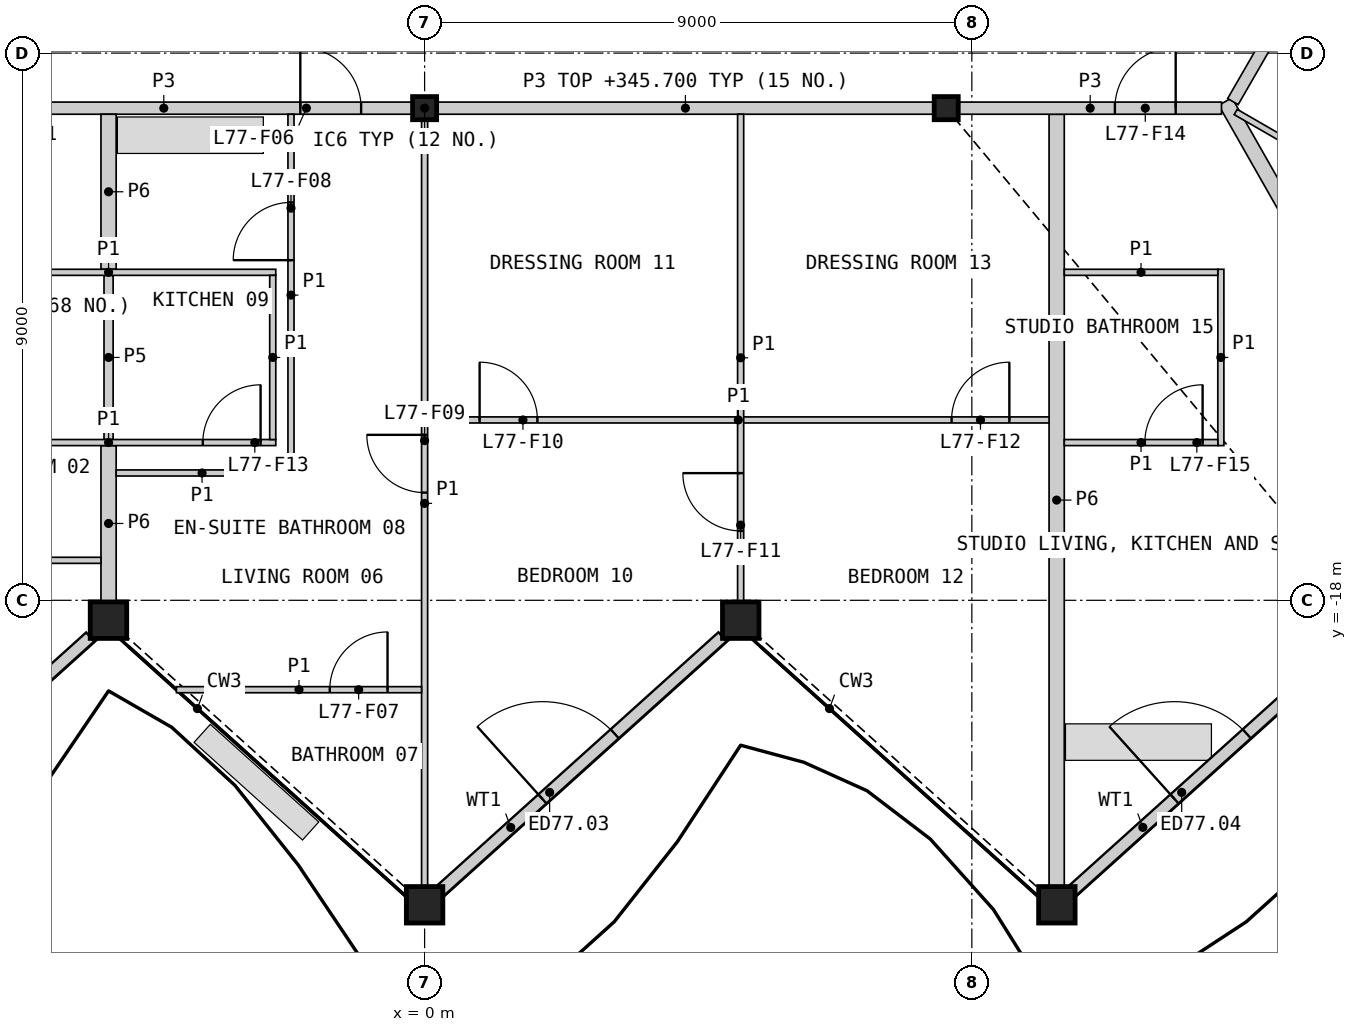
"""IFC4 building model, lengths in metres.
Left out: names, types, materials, properties, quantities, classifications, styles, units other than length and angle.
Written with IfcOpenShell. Run it as: python <this file> out.ifc"""

import sys

from ifc_helpers import new_model, si_unit, direction, frame, frame_2d, origin, origin_2d, place, context, subcontext, project, spatial, rectangle, hollow_rectangle, i_section, extrude, element, fill, save


model = new_model("IFC4")
c1 = context("Model", 3, precision=1e-05, world=origin(), true_north=direction((0.0, 1.0)))
c2 = subcontext(c1, "Body", "Model", "MODEL_VIEW")
j1 = project(units=[si_unit("LENGTHUNIT", "METRE"), si_unit("PLANEANGLEUNIT", "RADIAN")], contexts=[c1])
p1 = place(None, origin())
s1 = spatial("IfcSite", under=j1, at=p1, CompositionType="ELEMENT")
p2 = place(p1, origin())
s2 = spatial("IfcBuilding", under=s1, at=p2, CompositionType="ELEMENT")
p3 = place(p2, frame((0.0, 0.0, 342.6)))
s3 = spatial("IfcBuildingStorey", under=s2, at=p3, CompositionType="ELEMENT", Elevation=342.6)
for number, where, z_axis, x_axis in (
    (1, (-5.199, -18.327, 0.0), (0.0, 0.0, 1.0), (1.0, 0.0, 0.0)),
    (2, (0.0, -23.008, 0.0), (0.0, 0.0, 1.0), (1.0, 0.0, 0.0)),
    (3, (5.199, -18.327, 0.0), (0.0, 0.0, 1.0), (1.0, 0.0, 0.0)),
    (4, (10.398, -23.008, 0.0), (0.0, 0.0, 1.0), (1.0, 0.0, 0.0)),
):
    element("IfcColumn", number, at=place(p3, frame(where, z_axis=z_axis, x_axis=x_axis)), inside=s3, PredefinedType="COLUMN", context=c2, shape_type="SweptSolid", body=[
        extrude(hollow_rectangle(XDim=0.6, YDim=0.6, WallThickness=0.04, at=origin_2d()), origin(), (0.0, 0.0, 1.0), 3.4),
    ])
for number, where, z_axis, x_axis in (
    (5, (0.0, -9.906, 0.0), (0.0, 0.0, 1.0), (1.0, 0.0, 0.0)),
    (6, (8.578, -9.906, 0.0), (0.0, 0.0, 1.0), (1.0, 0.0, 0.0)),
):
    element("IfcColumn", number, at=place(p3, frame(where, z_axis=z_axis, x_axis=x_axis)), inside=s3, PredefinedType="COLUMN", context=c2, shape_type="SweptSolid", body=[
        extrude(i_section(OverallWidth=0.396, OverallDepth=0.381, WebThickness=0.019, FlangeThickness=0.03, at=origin_2d()), origin(), (0.0, 0.0, 1.0), 3.4),
    ])
p4 = place(p3, frame((-10.139, -22.781, 0.0), z_axis=(0.0, 0.0, 1.0), x_axis=(0.743144430218, 0.669131045339, 0.0)))
e7 = element("IfcWall", 7, at=p4, inside=s3, PredefinedType="SOLIDWALL", context=c2, shape_type="SweptSolid", body=[
    extrude(rectangle(XDim=6.244, YDim=0.2, at=frame_2d((3.122, 0.0))), origin(), (0.0, 0.0, 1.0), 2.488),
])
p5 = place(p4, frame((2.263, 0.0, 0.0)))
e8 = element("IfcOpeningElement", 8, at=p5, cuts=e7, PredefinedType="OPENING", context=c2, shape_type="SweptSolid", body=[
    extrude(rectangle(XDim=1.6, YDim=2.25, at=frame_2d((0.8, 1.125))), frame((0.0, 0.11, 0.0), z_axis=(0.0, -1.0, 0.0), x_axis=(1.0, 0.0, 0.0)), (0.0, 0.0, 1.0), 0.22),
])
p6 = place(p3, frame((0.256, -22.781, 0.0), z_axis=(0.0, 0.0, 1.0), x_axis=(0.743138703901, 0.669137404995, 0.0)))
e9 = element("IfcWall", 9, at=p6, inside=s3, PredefinedType="SOLIDWALL", context=c2, shape_type="SweptSolid", body=[
    extrude(rectangle(XDim=6.249, YDim=0.2, at=frame_2d((3.124, 0.0))), origin(), (0.0, 0.0, 1.0), 2.488),
])
p7 = place(p6, frame((2.263, 0.0, 0.0)))
e10 = element("IfcOpeningElement", 10, at=p7, cuts=e9, PredefinedType="OPENING", context=c2, shape_type="SweptSolid", body=[
    extrude(rectangle(XDim=1.6, YDim=2.25, at=frame_2d((0.8, 1.125))), frame((0.0, 0.11, 0.0), z_axis=(0.0, -1.0, 0.0), x_axis=(1.0, 0.0, 0.0)), (0.0, 0.0, 1.0), 0.22),
])
p8 = place(p3, frame((10.651, -22.781, 0.0), z_axis=(0.0, 0.0, 1.0), x_axis=(0.743154335217, 0.669120044572, 0.0)))
e11 = element("IfcWall", 11, at=p8, inside=s3, PredefinedType="SOLIDWALL", context=c2, shape_type="SweptSolid", body=[
    extrude(rectangle(XDim=6.252, YDim=0.2, at=frame_2d((3.126, 0.0))), origin(), (0.0, 0.0, 1.0), 2.488),
])
p9 = place(p8, frame((2.263, 0.0, 0.0)))
e12 = element("IfcOpeningElement", 12, at=p9, cuts=e11, PredefinedType="OPENING", context=c2, shape_type="SweptSolid", body=[
    extrude(rectangle(XDim=1.6, YDim=2.25, at=frame_2d((0.8, 1.125))), frame((0.0, 0.11, 0.0), z_axis=(0.0, -1.0, 0.0), x_axis=(1.0, 0.0, 0.0)), (0.0, 0.0, 1.0), 0.22),
])
p10 = place(p3, frame((13.169, -9.797, 0.0), z_axis=(0.0, 0.0, 1.0), x_axis=(0.494414335079, -0.869226360201, 0.0)))
e13 = element("IfcWall", 13, at=p10, inside=s3, PredefinedType="PARTITIONING", context=c2, shape_type="SweptSolid", body=[
    extrude(rectangle(XDim=14.842, YDim=0.25, at=frame_2d((7.421, 0.0))), origin(), (0.0, 0.0, 1.0), 2.33),
])
p11 = place(p3, frame((10.395, -22.698, 0.0), z_axis=(0.0, 0.0, 1.0), x_axis=(0.0, 1.0, 0.0)))
e14 = element("IfcWall", 14, at=p11, inside=s3, PredefinedType="PARTITIONING", context=c2, shape_type="SweptSolid", body=[
    extrude(rectangle(XDim=12.692, YDim=0.25, at=frame_2d((6.346, 0.0))), origin(), (0.0, 0.0, 1.0), 2.33),
])
p12 = place(p3, frame((0.208, -9.906, 0.0), z_axis=(0.0, 0.0, 1.0), x_axis=(1.0, 0.0, 0.0)))
e15 = element("IfcWall", 15, at=p12, inside=s3, PredefinedType="PARTITIONING", context=c2, shape_type="SweptSolid", body=[
    extrude(rectangle(XDim=8.163, YDim=0.2, at=frame_2d((4.082, 0.0))), origin(), (0.0, 0.0, 1.0), 3.1),
])
p13 = place(p3, frame((-8.371, -9.906, 0.0), z_axis=(0.0, 0.0, 1.0), x_axis=(1.0, 0.0, 0.0)))
e16 = element("IfcWall", 16, at=p13, inside=s3, PredefinedType="PARTITIONING", context=c2, shape_type="SweptSolid", body=[
    extrude(rectangle(XDim=8.163, YDim=0.2, at=frame_2d((4.082, 0.0))), origin(), (0.0, 0.0, 1.0), 3.1),
])
p14 = place(p13, frame((1.159, 0.0, 0.0)))
e17 = element("IfcOpeningElement", 17, at=p14, cuts=e16, PredefinedType="OPENING", context=c2, shape_type="SweptSolid", body=[
    extrude(rectangle(XDim=1.0, YDim=2.1, at=frame_2d((0.5, 1.05))), frame((0.0, 0.11, 0.0), z_axis=(0.0, -1.0, 0.0), x_axis=(1.0, 0.0, 0.0)), (0.0, 0.0, 1.0), 0.22),
])
p15 = place(p13, frame((6.327, 0.0, 0.0)))
e18 = element("IfcOpeningElement", 18, at=p15, cuts=e16, PredefinedType="OPENING", context=c2, shape_type="SweptSolid", body=[
    extrude(rectangle(XDim=1.0, YDim=2.1, at=frame_2d((0.5, 1.05))), frame((0.0, 0.11, 0.0), z_axis=(0.0, -1.0, 0.0), x_axis=(1.0, 0.0, 0.0)), (0.0, 0.0, 1.0), 0.22),
])
p16 = place(p3, frame((8.786, -9.906, 0.0), z_axis=(0.0, 0.0, 1.0), x_axis=(1.0, 0.0, 0.0)))
e19 = element("IfcWall", 19, at=p16, inside=s3, PredefinedType="PARTITIONING", context=c2, shape_type="SweptSolid", body=[
    extrude(rectangle(XDim=4.32, YDim=0.2, at=frame_2d((2.16, 0.0))), origin(), (0.0, 0.0, 1.0), 3.1),
])
p17 = place(p16, frame((2.566, 0.0, 0.0)))
e20 = element("IfcOpeningElement", 20, at=p17, cuts=e19, PredefinedType="OPENING", context=c2, shape_type="SweptSolid", body=[
    extrude(rectangle(XDim=1.0, YDim=2.1, at=frame_2d((0.5, 1.05))), frame((0.0, 0.11, 0.0), z_axis=(0.0, -1.0, 0.0), x_axis=(1.0, 0.0, 0.0)), (0.0, 0.0, 1.0), 0.22),
])
p18 = place(p3, frame((13.293, -9.797, 0.0), z_axis=(0.0, 0.0, 1.0), x_axis=(0.499967746641, 0.866044024469, 0.0)))
e21 = element("IfcWall", 21, at=p18, inside=s3, PredefinedType="PARTITIONING", context=c2, shape_type="SweptSolid", body=[
    extrude(rectangle(XDim=3.676, YDim=0.2, at=frame_2d((1.838, 0.0))), origin(), (0.0, 0.0, 1.0), 3.1),
])
p19 = place(p18, frame((2.426, 0.0, 0.0)))
e22 = element("IfcOpeningElement", 22, at=p19, cuts=e21, PredefinedType="OPENING", context=c2, shape_type="SweptSolid", body=[
    extrude(rectangle(XDim=1.0, YDim=2.1, at=frame_2d((0.5, 1.05))), frame((0.0, 0.11, 0.0), z_axis=(0.0, -1.0, 0.0), x_axis=(1.0, 0.0, 0.0)), (0.0, 0.0, 1.0), 0.22),
])
p20 = place(p3, frame((-5.198, -12.556, 0.0), z_axis=(0.0, 0.0, 1.0), x_axis=(0.0, 1.0, 0.0)))
e23 = element("IfcWall", 23, at=p20, inside=s3, PredefinedType="PARTITIONING", context=c2, shape_type="SweptSolid", body=[
    extrude(rectangle(XDim=2.55, YDim=0.25, at=frame_2d((1.275, 0.0))), origin(), (0.0, 0.0, 1.0), 2.33),
])
p21 = place(p3, frame((-5.198, -18.017, 0.0), z_axis=(0.0, 0.0, 1.0), x_axis=(0.0, 1.0, 0.0)))
e24 = element("IfcWall", 24, at=p21, inside=s3, PredefinedType="PARTITIONING", context=c2, shape_type="SweptSolid", body=[
    extrude(rectangle(XDim=2.561, YDim=0.25, at=frame_2d((1.281, 0.0))), origin(), (0.0, 0.0, 1.0), 2.33),
])
p22 = place(p3, frame((-5.198, -15.356, 0.0), z_axis=(0.0, 0.0, 1.0), x_axis=(0.0, 1.0, 0.0)))
e25 = element("IfcWall", 25, at=p22, inside=s3, PredefinedType="PLUMBINGWALL", context=c2, shape_type="SweptSolid", body=[
    extrude(rectangle(XDim=2.7, YDim=0.15, at=frame_2d((1.35, 0.0))), origin(), (0.0, 0.0, 1.0), 2.33),
])
p23 = place(p3, frame((0.0, -22.698, 0.0), z_axis=(0.0, 0.0, 1.0), x_axis=(0.0, 1.0, 0.0)))
e26 = element("IfcWall", 26, at=p23, inside=s3, PredefinedType="PARTITIONING", context=c2, shape_type="SweptSolid", body=[
    extrude(rectangle(XDim=12.585, YDim=0.1, at=frame_2d((6.292, 0.0))), origin(), (0.0, 0.0, 1.0), 2.33),
])
p24 = place(p23, frame((6.469, 0.0, 0.0)))
e27 = element("IfcOpeningElement", 27, at=p24, cuts=e26, PredefinedType="OPENING", context=c2, shape_type="SweptSolid", body=[
    extrude(rectangle(XDim=0.95, YDim=2.1, at=frame_2d((0.475, 1.05))), frame((0.0, 0.06, 0.0), z_axis=(0.0, -1.0, 0.0), x_axis=(1.0, 0.0, 0.0)), (0.0, 0.0, 1.0), 0.12),
])
p25 = place(p3, frame((0.05, -15.033, 0.0), z_axis=(0.0, 0.0, 1.0), x_axis=(1.0, 0.0, 0.0)))
e28 = element("IfcWall", 28, at=p25, inside=s3, PredefinedType="PARTITIONING", context=c2, shape_type="SweptSolid", body=[
    extrude(rectangle(XDim=10.22, YDim=0.1, at=frame_2d((5.11, 0.0))), origin(), (0.0, 0.0, 1.0), 2.33),
])
p26 = place(p25, frame((0.855, 0.0, 0.0)))
e29 = element("IfcOpeningElement", 29, at=p26, cuts=e28, PredefinedType="OPENING", context=c2, shape_type="SweptSolid", body=[
    extrude(rectangle(XDim=0.95, YDim=2.1, at=frame_2d((0.475, 1.05))), frame((0.0, 0.06, 0.0), z_axis=(0.0, -1.0, 0.0), x_axis=(1.0, 0.0, 0.0)), (0.0, 0.0, 1.0), 0.12),
])
p27 = place(p25, frame((8.617, 0.0, 0.0)))
e30 = element("IfcOpeningElement", 30, at=p27, cuts=e28, PredefinedType="OPENING", context=c2, shape_type="SweptSolid", body=[
    extrude(rectangle(XDim=0.95, YDim=2.1, at=frame_2d((0.475, 1.05))), frame((0.0, 0.06, 0.0), z_axis=(0.0, -1.0, 0.0), x_axis=(1.0, 0.0, 0.0)), (0.0, 0.0, 1.0), 0.12),
])
p28 = place(p3, frame((5.198, -18.017, 0.0), z_axis=(0.0, 0.0, 1.0), x_axis=(0.0, 1.0, 0.0)))
e31 = element("IfcWall", 31, at=p28, inside=s3, PredefinedType="PARTITIONING", context=c2, shape_type="SweptSolid", body=[
    extrude(rectangle(XDim=8.011, YDim=0.1, at=frame_2d((4.006, 0.0))), origin(), (0.0, 0.0, 1.0), 2.33),
])
p29 = place(p28, frame((1.158, 0.0, 0.0)))
e32 = element("IfcOpeningElement", 32, at=p29, cuts=e31, PredefinedType="OPENING", context=c2, shape_type="SweptSolid", body=[
    extrude(rectangle(XDim=0.95, YDim=2.1, at=frame_2d((0.475, 1.05))), frame((0.0, 0.06, 0.0), z_axis=(0.0, -1.0, 0.0), x_axis=(1.0, 0.0, 0.0)), (0.0, 0.0, 1.0), 0.12),
])
p30 = place(p3, frame((-2.198, -15.956, 0.0), z_axis=(0.0, 0.0, 1.0), x_axis=(0.0, 1.0, 0.0)))
e33 = element("IfcWall", 33, at=p30, inside=s3, PredefinedType="PARTITIONING", context=c2, shape_type="SweptSolid", body=[
    extrude(rectangle(XDim=5.95, YDim=0.1, at=frame_2d((2.975, 0.0))), origin(), (0.0, 0.0, 1.0), 2.33),
])
p31 = place(p30, frame((3.55, 0.0, 0.0)))
e34 = element("IfcOpeningElement", 34, at=p31, cuts=e33, PredefinedType="OPENING", context=c2, shape_type="SweptSolid", body=[
    extrude(rectangle(XDim=0.95, YDim=2.1, at=frame_2d((0.475, 1.05))), frame((0.0, 0.06, 0.0), z_axis=(0.0, -1.0, 0.0), x_axis=(1.0, 0.0, 0.0)), (0.0, 0.0, 1.0), 0.12),
])
p32 = place(p3, frame((-7.948, -12.606, 0.0), z_axis=(0.0, 0.0, 1.0), x_axis=(1.0, 0.0, 0.0)))
e35 = element("IfcWall", 35, at=p32, inside=s3, PredefinedType="PARTITIONING", context=c2, shape_type="SweptSolid", body=[
    extrude(rectangle(XDim=5.5, YDim=0.1, at=frame_2d((2.75, 0.0))), origin(), (0.0, 0.0, 1.0), 2.33),
])
p33 = place(p3, frame((-7.948, -15.406, 0.0), z_axis=(0.0, 0.0, 1.0), x_axis=(1.0, 0.0, 0.0)))
e36 = element("IfcWall", 36, at=p33, inside=s3, PredefinedType="PARTITIONING", context=c2, shape_type="SweptSolid", body=[
    extrude(rectangle(XDim=5.5, YDim=0.1, at=frame_2d((2.75, 0.0))), origin(), (0.0, 0.0, 1.0), 2.33),
])
p34 = place(p33, frame((4.3, 0.0, 0.0)))
e37 = element("IfcOpeningElement", 37, at=p34, cuts=e36, PredefinedType="OPENING", context=c2, shape_type="SweptSolid", body=[
    extrude(rectangle(XDim=0.95, YDim=2.1, at=frame_2d((0.475, 1.05))), frame((0.0, 0.06, 0.0), z_axis=(0.0, -1.0, 0.0), x_axis=(1.0, 0.0, 0.0)), (0.0, 0.0, 1.0), 0.12),
])
p35 = place(p3, frame((-10.345, -17.342, 0.0), z_axis=(0.0, 0.0, 1.0), x_axis=(1.0, 0.0, 0.0)))
e38 = element("IfcWall", 38, at=p35, inside=s3, PredefinedType="PARTITIONING", context=c2, shape_type="SweptSolid", body=[
    extrude(rectangle(XDim=5.023, YDim=0.1, at=frame_2d((2.511, 0.0))), origin(), (0.0, 0.0, 1.0), 2.33),
])
p36 = place(p35, frame((0.76, 0.0, 0.0)))
e39 = element("IfcOpeningElement", 39, at=p36, cuts=e38, PredefinedType="OPENING", context=c2, shape_type="SweptSolid", body=[
    extrude(rectangle(XDim=0.95, YDim=2.1, at=frame_2d((0.475, 1.05))), frame((0.0, 0.06, 0.0), z_axis=(0.0, -1.0, 0.0), x_axis=(1.0, 0.0, 0.0)), (0.0, 0.0, 1.0), 0.12),
])
p37 = place(p3, frame((-4.082, -19.47, 0.0), z_axis=(0.0, 0.0, 1.0), x_axis=(1.0, 0.0, 0.0)))
e40 = element("IfcWall", 40, at=p37, inside=s3, PredefinedType="PARTITIONING", context=c2, shape_type="SweptSolid", body=[
    extrude(rectangle(XDim=4.031, YDim=0.1, at=frame_2d((2.016, 0.0))), origin(), (0.0, 0.0, 1.0), 2.33),
])
p38 = place(p37, frame((2.522, 0.0, 0.0)))
e41 = element("IfcOpeningElement", 41, at=p38, cuts=e40, PredefinedType="OPENING", context=c2, shape_type="SweptSolid", body=[
    extrude(rectangle(XDim=0.95, YDim=2.1, at=frame_2d((0.475, 1.05))), frame((0.0, 0.06, 0.0), z_axis=(0.0, -1.0, 0.0), x_axis=(1.0, 0.0, 0.0)), (0.0, 0.0, 1.0), 0.12),
])
p39 = place(p3, frame((-5.073, -15.906, 0.0), z_axis=(0.0, 0.0, 1.0), x_axis=(1.0, 0.0, 0.0)))
e42 = element("IfcWall", 42, at=p39, inside=s3, PredefinedType="PARTITIONING", context=c2, shape_type="SweptSolid", body=[
    extrude(rectangle(XDim=2.825, YDim=0.1, at=frame_2d((1.413, 0.0))), origin(), (0.0, 0.0, 1.0), 2.33),
])
p40 = place(p3, frame((-2.498, -15.356, 0.0), z_axis=(0.0, 0.0, 1.0), x_axis=(0.0, 1.0, 0.0)))
e43 = element("IfcWall", 43, at=p40, inside=s3, PredefinedType="PARTITIONING", context=c2, shape_type="SweptSolid", body=[
    extrude(rectangle(XDim=2.7, YDim=0.1, at=frame_2d((1.35, 0.0))), origin(), (0.0, 0.0, 1.0), 2.33),
])
p41 = place(p3, frame((13.095, -15.456, 0.0), z_axis=(0.0, 0.0, 1.0), x_axis=(0.0, 1.0, 0.0)))
e44 = element("IfcWall", 44, at=p41, inside=s3, PredefinedType="PARTITIONING", context=c2, shape_type="SweptSolid", body=[
    extrude(rectangle(XDim=2.9, YDim=0.1, at=frame_2d((1.45, 0.0))), origin(), (0.0, 0.0, 1.0), 2.33),
])
p42 = place(p3, frame((10.52, -12.606, 0.0), z_axis=(0.0, 0.0, 1.0), x_axis=(1.0, 0.0, 0.0)))
e45 = element("IfcWall", 45, at=p42, inside=s3, PredefinedType="PARTITIONING", context=c2, shape_type="SweptSolid", body=[
    extrude(rectangle(XDim=2.525, YDim=0.1, at=frame_2d((1.263, 0.0))), origin(), (0.0, 0.0, 1.0), 2.33),
])
p43 = place(p3, frame((10.52, -15.406, 0.0), z_axis=(0.0, 0.0, 1.0), x_axis=(1.0, 0.0, 0.0)))
e46 = element("IfcWall", 46, at=p43, inside=s3, PredefinedType="PARTITIONING", context=c2, shape_type="SweptSolid", body=[
    extrude(rectangle(XDim=2.525, YDim=0.1, at=frame_2d((1.263, 0.0))), origin(), (0.0, 0.0, 1.0), 2.33),
])
p44 = place(p43, frame((1.325, 0.0, 0.0)))
e47 = element("IfcOpeningElement", 47, at=p44, cuts=e46, PredefinedType="OPENING", context=c2, shape_type="SweptSolid", body=[
    extrude(rectangle(XDim=0.95, YDim=2.1, at=frame_2d((0.475, 1.05))), frame((0.0, 0.06, 0.0), z_axis=(0.0, -1.0, 0.0), x_axis=(1.0, 0.0, 0.0)), (0.0, 0.0, 1.0), 0.12),
])
p45 = place(p3, frame((13.339, -9.968, 0.0), z_axis=(0.0, 0.0, 1.0), x_axis=(0.866036909293, -0.499980071345, 0.0)))
e48 = element("IfcWall", 48, at=p45, inside=s3, PredefinedType="PARTITIONING", context=c2, shape_type="SweptSolid", body=[
    extrude(rectangle(XDim=2.625, YDim=0.1, at=frame_2d((1.312, 0.0))), origin(), (0.0, 0.0, 1.0), 2.33),
])
p46 = place(p7, origin())
e49 = element("IfcDoor", 49, at=p46, inside=s3, OperationType="DOUBLE_DOOR_SINGLE_SWING", PredefinedType="DOOR", context=c2, shape_type="SweptSolid", body=[
    extrude(rectangle(XDim=1.6, YDim=2.25, at=frame_2d((0.8, 1.125))), frame((0.0, 0.025, 0.0), z_axis=(0.0, -1.0, 0.0), x_axis=(1.0, 0.0, 0.0)), (0.0, 0.0, 1.0), 0.05),
])
fill(e10, e49)
p47 = place(p9, origin())
e50 = element("IfcDoor", 50, at=p47, inside=s3, OperationType="DOUBLE_DOOR_SINGLE_SWING", PredefinedType="DOOR", context=c2, shape_type="SweptSolid", body=[
    extrude(rectangle(XDim=1.6, YDim=2.25, at=frame_2d((0.8, 1.125))), frame((0.0, 0.025, 0.0), z_axis=(0.0, -1.0, 0.0), x_axis=(1.0, 0.0, 0.0)), (0.0, 0.0, 1.0), 0.05),
])
fill(e12, e50)
p48 = place(p15, origin())
e51 = element("IfcDoor", 51, at=p48, inside=s3, OperationType="SINGLE_SWING_LEFT", PredefinedType="DOOR", context=c2, shape_type="SweptSolid", body=[
    extrude(rectangle(XDim=1.0, YDim=2.1, at=frame_2d((0.5, 1.05))), frame((0.0, 0.025, 0.0), z_axis=(0.0, -1.0, 0.0), x_axis=(1.0, 0.0, 0.0)), (0.0, 0.0, 1.0), 0.05),
])
fill(e18, e51)
p49 = place(p38, origin())
e52 = element("IfcDoor", 52, at=p49, inside=s3, OperationType="SINGLE_SWING_RIGHT", PredefinedType="DOOR", context=c2, shape_type="SweptSolid", body=[
    extrude(rectangle(XDim=0.95, YDim=2.1, at=frame_2d((0.475, 1.05))), frame((0.0, 0.025, 0.0), z_axis=(0.0, -1.0, 0.0), x_axis=(1.0, 0.0, 0.0)), (0.0, 0.0, 1.0), 0.05),
])
fill(e41, e52)
p50 = place(p31, origin())
e53 = element("IfcDoor", 53, at=p50, inside=s3, OperationType="SINGLE_SWING_LEFT", PredefinedType="DOOR", context=c2, shape_type="SweptSolid", body=[
    extrude(rectangle(XDim=0.95, YDim=2.1, at=frame_2d((0.475, 1.05))), frame((0.0, 0.025, 0.0), z_axis=(0.0, -1.0, 0.0), x_axis=(1.0, 0.0, 0.0)), (0.0, 0.0, 1.0), 0.05),
])
fill(e34, e53)
p51 = place(p24, origin())
e54 = element("IfcDoor", 54, at=p51, inside=s3, OperationType="SINGLE_SWING_RIGHT", PredefinedType="DOOR", context=c2, shape_type="SweptSolid", body=[
    extrude(rectangle(XDim=0.95, YDim=2.1, at=frame_2d((0.475, 1.05))), frame((0.0, 0.025, 0.0), z_axis=(0.0, -1.0, 0.0), x_axis=(1.0, 0.0, 0.0)), (0.0, 0.0, 1.0), 0.05),
])
fill(e27, e54)
p52 = place(p26, origin())
e55 = element("IfcDoor", 55, at=p52, inside=s3, OperationType="SINGLE_SWING_LEFT", PredefinedType="DOOR", context=c2, shape_type="SweptSolid", body=[
    extrude(rectangle(XDim=0.95, YDim=2.1, at=frame_2d((0.475, 1.05))), frame((0.0, 0.025, 0.0), z_axis=(0.0, -1.0, 0.0), x_axis=(1.0, 0.0, 0.0)), (0.0, 0.0, 1.0), 0.05),
])
fill(e29, e55)
p53 = place(p29, origin())
e56 = element("IfcDoor", 56, at=p53, inside=s3, OperationType="SINGLE_SWING_RIGHT", PredefinedType="DOOR", context=c2, shape_type="SweptSolid", body=[
    extrude(rectangle(XDim=0.95, YDim=2.1, at=frame_2d((0.475, 1.05))), frame((0.0, 0.025, 0.0), z_axis=(0.0, -1.0, 0.0), x_axis=(1.0, 0.0, 0.0)), (0.0, 0.0, 1.0), 0.05),
])
fill(e32, e56)
p54 = place(p27, origin())
e57 = element("IfcDoor", 57, at=p54, inside=s3, OperationType="SINGLE_SWING_RIGHT", PredefinedType="DOOR", context=c2, shape_type="SweptSolid", body=[
    extrude(rectangle(XDim=0.95, YDim=2.1, at=frame_2d((0.475, 1.05))), frame((0.0, 0.025, 0.0), z_axis=(0.0, -1.0, 0.0), x_axis=(1.0, 0.0, 0.0)), (0.0, 0.0, 1.0), 0.05),
])
fill(e30, e57)
p55 = place(p34, origin())
e58 = element("IfcDoor", 58, at=p55, inside=s3, OperationType="SINGLE_SWING_RIGHT", PredefinedType="DOOR", context=c2, shape_type="SweptSolid", body=[
    extrude(rectangle(XDim=0.95, YDim=2.1, at=frame_2d((0.475, 1.05))), frame((0.0, 0.025, 0.0), z_axis=(0.0, -1.0, 0.0), x_axis=(1.0, 0.0, 0.0)), (0.0, 0.0, 1.0), 0.05),
])
fill(e37, e58)
p56 = place(p17, origin())
e59 = element("IfcDoor", 59, at=p56, inside=s3, OperationType="SINGLE_SWING_RIGHT", PredefinedType="DOOR", context=c2, shape_type="SweptSolid", body=[
    extrude(rectangle(XDim=1.0, YDim=2.1, at=frame_2d((0.5, 1.05))), frame((0.0, 0.025, 0.0), z_axis=(0.0, -1.0, 0.0), x_axis=(1.0, 0.0, 0.0)), (0.0, 0.0, 1.0), 0.05),
])
fill(e20, e59)
p57 = place(p44, origin())
e60 = element("IfcDoor", 60, at=p57, inside=s3, OperationType="SINGLE_SWING_RIGHT", PredefinedType="DOOR", context=c2, shape_type="SweptSolid", body=[
    extrude(rectangle(XDim=0.95, YDim=2.1, at=frame_2d((0.475, 1.05))), frame((0.0, 0.025, 0.0), z_axis=(0.0, -1.0, 0.0), x_axis=(1.0, 0.0, 0.0)), (0.0, 0.0, 1.0), 0.05),
])
fill(e47, e60)
save(model, sys.argv[1])
